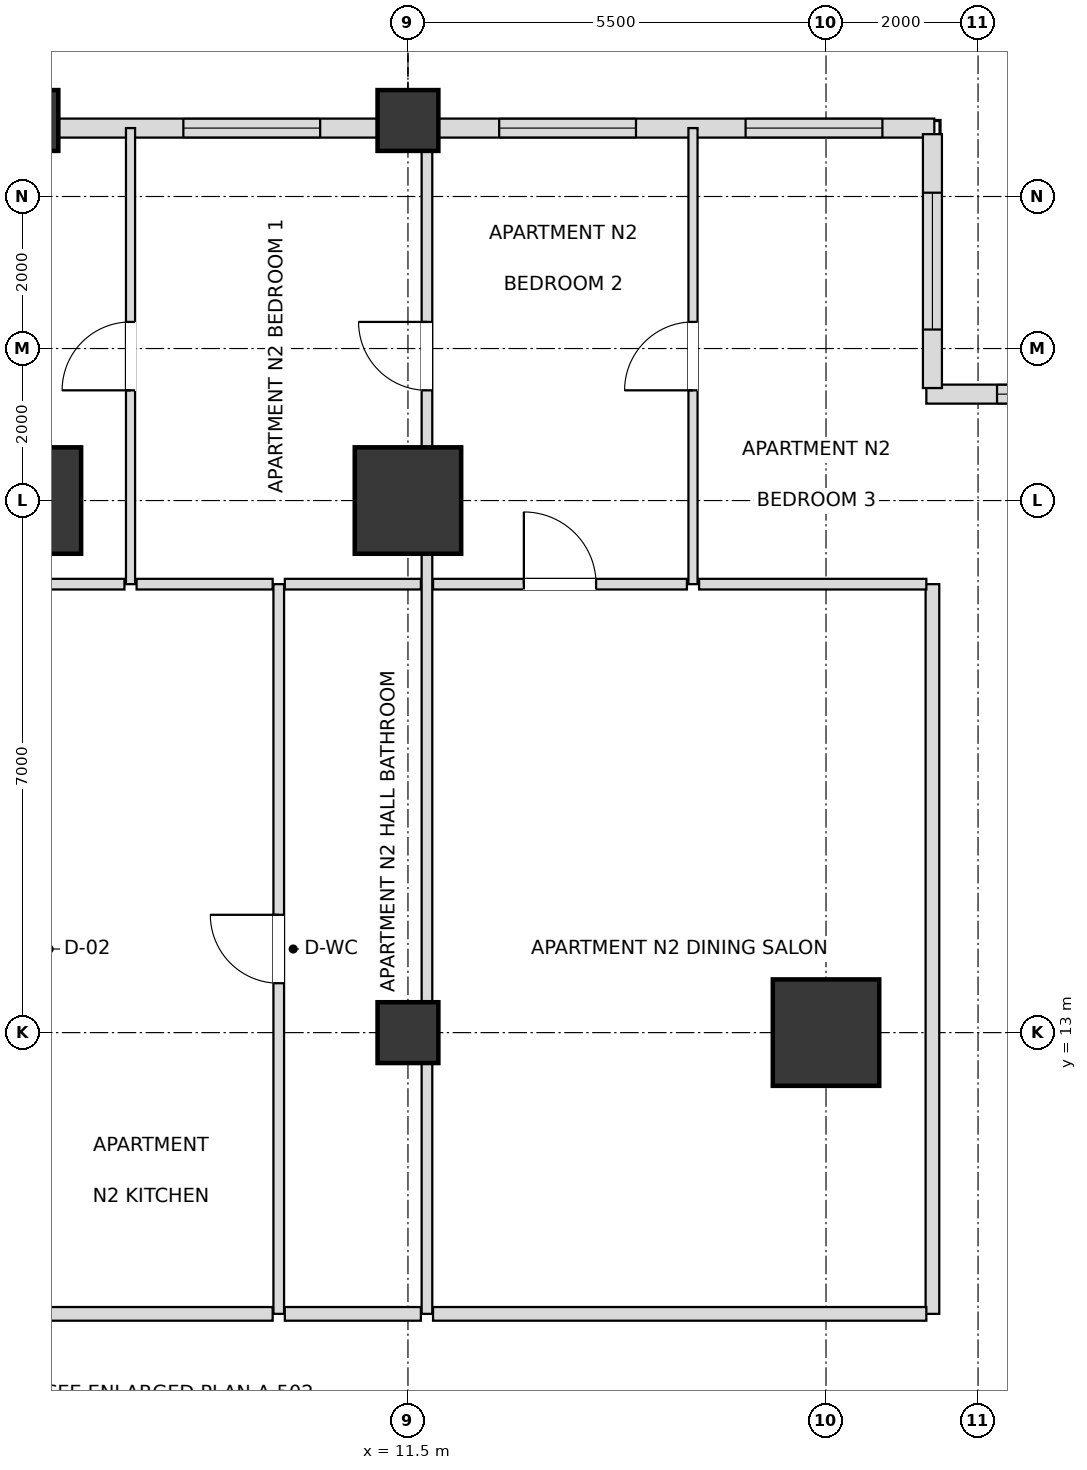
"""IFC4 building model, lengths in metres.
Left out: names, types, materials, properties, quantities, classifications, styles, units other than length and angle.
Written with IfcOpenShell. Run it as: python <this file> out.ifc"""

import sys

from ifc_helpers import new_model, si_unit, direction, frame, frame_2d, origin, origin_2d, place, context, subcontext, project, spatial, rectangle, extrude, element, fill, save


model = new_model("IFC4")
c1 = context("Model", 3, precision=1e-05, world=origin(), true_north=direction((0.0, 1.0)))
c2 = subcontext(c1, "Body", "Model", "MODEL_VIEW")
j1 = project(units=[si_unit("LENGTHUNIT", "METRE"), si_unit("PLANEANGLEUNIT", "RADIAN")], contexts=[c1])
p1 = place(None, origin())
s1 = spatial("IfcSite", under=j1, at=p1, CompositionType="ELEMENT")
p2 = place(p1, origin())
s2 = spatial("IfcBuilding", under=s1, at=p2, CompositionType="ELEMENT")
p3 = place(p2, frame((0.0, 0.0, 61.2)))
s3 = spatial("IfcBuildingStorey", under=s2, at=p3, CompositionType="ELEMENT", Elevation=61.2)
for number, where, z_axis, x_axis in (
    (1, (17.0, 13.0, 0.0), (0.0, 0.0, 1.0), (1.0, 0.0, 0.0)),
    (2, (11.5, 20.0, 0.0), (0.0, 0.0, 1.0), (1.0, 0.0, 0.0)),
    (3, (6.5, 20.0, 0.0), (0.0, 0.0, 1.0), (1.0, 0.0, 0.0)),
):
    element("IfcColumn", number, at=place(p3, frame(where, z_axis=z_axis, x_axis=x_axis)), inside=s3, PredefinedType="USERDEFINED", context=c2, shape_type="SweptSolid", body=[
        extrude(rectangle(XDim=1.4, YDim=1.4, at=origin_2d()), origin(), (0.0, 0.0, 1.0), 3.6),
    ])
for number, where, z_axis, x_axis in (
    (4, (11.5, 13.0, 0.0), (0.0, 0.0, 1.0), (1.0, 0.0, 0.0)),
    (5, (6.5, 25.0, 0.0), (0.0, 0.0, 1.0), (1.0, 0.0, 0.0)),
    (6, (11.5, 25.0, 0.0), (0.0, 0.0, 1.0), (1.0, 0.0, 0.0)),
):
    element("IfcColumn", number, at=place(p3, frame(where, z_axis=z_axis, x_axis=x_axis)), inside=s3, PredefinedType="COLUMN", context=c2, shape_type="SweptSolid", body=[
        extrude(rectangle(XDim=0.8, YDim=0.8, at=origin_2d()), origin(), (0.0, 0.0, 1.0), 3.6),
    ])
p4 = place(p3, frame((18.425, 24.9, 0.0), z_axis=(0.0, 0.0, 1.0), x_axis=(-1.0, 0.0, 0.0)))
e7 = element("IfcWall", 7, at=p4, inside=s3, PredefinedType="SOLIDWALL", context=c2, shape_type="SweptSolid", body=[
    extrude(rectangle(XDim=6.53, YDim=0.25, at=frame_2d((3.265, 0.0))), origin(), (0.0, 0.0, 1.0), 2.736),
])
p5 = place(p4, frame((0.683, 0.0, 0.72)))
e8 = element("IfcOpeningElement", 8, at=p5, cuts=e7, PredefinedType="OPENING", context=c2, shape_type="SweptSolid", body=[
    extrude(rectangle(XDim=1.8, YDim=1.68, at=frame_2d((0.9, 0.84))), frame((0.0, 0.135, 0.0), z_axis=(0.0, -1.0, 0.0), x_axis=(1.0, 0.0, 0.0)), (0.0, 0.0, 1.0), 0.27),
])
p6 = place(p4, frame((3.925, 0.0, 0.72)))
e9 = element("IfcOpeningElement", 9, at=p6, cuts=e7, PredefinedType="OPENING", context=c2, shape_type="SweptSolid", body=[
    extrude(rectangle(XDim=1.8, YDim=1.68, at=frame_2d((0.9, 0.84))), frame((0.0, 0.135, 0.0), z_axis=(0.0, -1.0, 0.0), x_axis=(1.0, 0.0, 0.0)), (0.0, 0.0, 1.0), 0.27),
])
p7 = place(p3, frame((11.105, 24.9, 0.0), z_axis=(0.0, 0.0, 1.0), x_axis=(-1.0, 0.0, 0.0)))
e10 = element("IfcWall", 10, at=p7, inside=s3, PredefinedType="SOLIDWALL", context=c2, shape_type="SweptSolid", body=[
    extrude(rectangle(XDim=4.21, YDim=0.25, at=frame_2d((2.105, 0.0))), origin(), (0.0, 0.0, 1.0), 2.736),
])
p8 = place(p7, frame((0.76, 0.0, 0.72)))
e11 = element("IfcOpeningElement", 11, at=p8, cuts=e10, PredefinedType="OPENING", context=c2, shape_type="SweptSolid", body=[
    extrude(rectangle(XDim=1.8, YDim=1.68, at=frame_2d((0.9, 0.84))), frame((0.0, 0.135, 0.0), z_axis=(0.0, -1.0, 0.0), x_axis=(1.0, 0.0, 0.0)), (0.0, 0.0, 1.0), 0.27),
])
p9 = place(p3, frame((21.98, 21.4, 0.0), z_axis=(0.0, 0.0, 1.0), x_axis=(-1.0, 0.0, 0.0)))
e12 = element("IfcWall", 12, at=p9, inside=s3, PredefinedType="SOLIDWALL", context=c2, shape_type="SweptSolid", body=[
    extrude(rectangle(XDim=3.66, YDim=0.25, at=frame_2d((1.83, 0.0))), origin(), (0.0, 0.0, 1.0), 2.736),
])
p10 = place(p9, frame((0.93, 0.0, 0.72)))
e13 = element("IfcOpeningElement", 13, at=p10, cuts=e12, PredefinedType="OPENING", context=c2, shape_type="SweptSolid", body=[
    extrude(rectangle(XDim=1.8, YDim=1.68, at=frame_2d((0.9, 0.84))), frame((0.0, 0.135, 0.0), z_axis=(0.0, -1.0, 0.0), x_axis=(1.0, 0.0, 0.0)), (0.0, 0.0, 1.0), 0.27),
])
p11 = place(p3, frame((18.4, 21.48, 0.0), z_axis=(0.0, 0.0, 1.0), x_axis=(0.0, 1.0, 0.0)))
e14 = element("IfcWall", 14, at=p11, inside=s3, PredefinedType="SOLIDWALL", context=c2, shape_type="SweptSolid", body=[
    extrude(rectangle(XDim=3.34, YDim=0.25, at=frame_2d((1.67, 0.0))), origin(), (0.0, 0.0, 1.0), 2.736),
])
p12 = place(p11, frame((0.77, 0.0, 0.72)))
e15 = element("IfcOpeningElement", 15, at=p12, cuts=e14, PredefinedType="OPENING", context=c2, shape_type="SweptSolid", body=[
    extrude(rectangle(XDim=1.8, YDim=1.68, at=frame_2d((0.9, 0.84))), frame((0.0, 0.135, 0.0), z_axis=(0.0, -1.0, 0.0), x_axis=(1.0, 0.0, 0.0)), (0.0, 0.0, 1.0), 0.27),
])
p13 = place(p3, frame((7.85, 18.9, 0.0), z_axis=(0.0, 0.0, 1.0), x_axis=(0.0, 1.0, 0.0)))
e16 = element("IfcWall", 16, at=p13, inside=s3, PredefinedType="PARTITIONING", context=c2, shape_type="SweptSolid", body=[
    extrude(rectangle(XDim=6.0, YDim=0.12, at=frame_2d((3.0, 0.0))), origin(), (0.0, 0.0, 1.0), 2.816),
])
p14 = place(p13, frame((2.55, 0.0, 0.0)))
e17 = element("IfcOpeningElement", 17, at=p14, cuts=e16, PredefinedType="OPENING", context=c2, shape_type="SweptSolid", body=[
    extrude(rectangle(XDim=0.9, YDim=2.1, at=frame_2d((0.45, 1.05))), frame((0.0, 0.07, 0.0), z_axis=(0.0, -1.0, 0.0), x_axis=(1.0, 0.0, 0.0)), (0.0, 0.0, 1.0), 0.14),
])
p15 = place(p3, frame((9.8, 9.3, 0.0), z_axis=(0.0, 0.0, 1.0), x_axis=(0.0, 1.0, 0.0)))
e18 = element("IfcWall", 18, at=p15, inside=s3, PredefinedType="PARTITIONING", context=c2, shape_type="SweptSolid", body=[
    extrude(rectangle(XDim=9.6, YDim=0.14, at=frame_2d((4.8, 0.0))), origin(), (0.0, 0.0, 1.0), 2.816),
])
p16 = place(p15, frame((4.35, 0.0, 0.0)))
e19 = element("IfcOpeningElement", 19, at=p16, cuts=e18, PredefinedType="OPENING", context=c2, shape_type="SweptSolid", body=[
    extrude(rectangle(XDim=0.9, YDim=2.1, at=frame_2d((0.45, 1.05))), frame((0.0, 0.08, 0.0), z_axis=(0.0, -1.0, 0.0), x_axis=(1.0, 0.0, 0.0)), (0.0, 0.0, 1.0), 0.16),
])
p17 = place(p3, frame((11.75, 9.3, 0.0), z_axis=(0.0, 0.0, 1.0), x_axis=(0.0, 1.0, 0.0)))
e20 = element("IfcWall", 20, at=p17, inside=s3, PredefinedType="PARTITIONING", context=c2, shape_type="SweptSolid", body=[
    extrude(rectangle(XDim=15.6, YDim=0.14, at=frame_2d((7.8, 0.0))), origin(), (0.0, 0.0, 1.0), 2.736),
])
p18 = place(p17, frame((12.15, 0.0, 0.0)))
e21 = element("IfcOpeningElement", 21, at=p18, cuts=e20, PredefinedType="OPENING", context=c2, shape_type="SweptSolid", body=[
    extrude(rectangle(XDim=0.9, YDim=2.1, at=frame_2d((0.45, 1.05))), frame((0.0, 0.08, 0.0), z_axis=(0.0, -1.0, 0.0), x_axis=(1.0, 0.0, 0.0)), (0.0, 0.0, 1.0), 0.16),
])
p19 = place(p3, frame((15.25, 18.9, 0.0), z_axis=(0.0, 0.0, 1.0), x_axis=(0.0, 1.0, 0.0)))
e22 = element("IfcWall", 22, at=p19, inside=s3, PredefinedType="PARTITIONING", context=c2, shape_type="SweptSolid", body=[
    extrude(rectangle(XDim=6.0, YDim=0.12, at=frame_2d((3.0, 0.0))), origin(), (0.0, 0.0, 1.0), 2.736),
])
p20 = place(p19, frame((2.55, 0.0, 0.0)))
e23 = element("IfcOpeningElement", 23, at=p20, cuts=e22, PredefinedType="OPENING", context=c2, shape_type="SweptSolid", body=[
    extrude(rectangle(XDim=0.9, YDim=2.1, at=frame_2d((0.45, 1.05))), frame((0.0, 0.07, 0.0), z_axis=(0.0, -1.0, 0.0), x_axis=(1.0, 0.0, 0.0)), (0.0, 0.0, 1.0), 0.14),
])
p21 = place(p3, frame((18.4, 9.3, 0.0), z_axis=(0.0, 0.0, 1.0), x_axis=(0.0, 1.0, 0.0)))
e24 = element("IfcWall", 24, at=p21, inside=s3, PredefinedType="PARTITIONING", context=c2, shape_type="SweptSolid", body=[
    extrude(rectangle(XDim=9.6, YDim=0.18, at=frame_2d((4.8, 0.0))), origin(), (0.0, 0.0, 1.0), 2.736),
])
p22 = place(p3, frame((6.68, 9.3, 0.0), z_axis=(0.0, 0.0, 1.0), x_axis=(1.0, 0.0, 0.0)))
e25 = element("IfcWall", 25, at=p22, inside=s3, PredefinedType="PARTITIONING", context=c2, shape_type="SweptSolid", body=[
    extrude(rectangle(XDim=3.04, YDim=0.18, at=frame_2d((1.52, 0.0))), origin(), (0.0, 0.0, 1.0), 3.38),
])
p23 = place(p3, frame((9.88, 9.3, 0.0), z_axis=(0.0, 0.0, 1.0), x_axis=(1.0, 0.0, 0.0)))
e26 = element("IfcWall", 26, at=p23, inside=s3, PredefinedType="PARTITIONING", context=c2, shape_type="SweptSolid", body=[
    extrude(rectangle(XDim=1.79, YDim=0.18, at=frame_2d((0.895, 0.0))), origin(), (0.0, 0.0, 1.0), 3.38),
])
p24 = place(p3, frame((11.83, 9.3, 0.0), z_axis=(0.0, 0.0, 1.0), x_axis=(1.0, 0.0, 0.0)))
e27 = element("IfcWall", 27, at=p24, inside=s3, PredefinedType="PARTITIONING", context=c2, shape_type="SweptSolid", body=[
    extrude(rectangle(XDim=6.49, YDim=0.18, at=frame_2d((3.245, 0.0))), origin(), (0.0, 0.0, 1.0), 2.816),
])
p25 = place(p3, frame((6.68, 18.9, 0.0), z_axis=(0.0, 0.0, 1.0), x_axis=(1.0, 0.0, 0.0)))
e28 = element("IfcWall", 28, at=p25, inside=s3, PredefinedType="PARTITIONING", context=c2, shape_type="SweptSolid", body=[
    extrude(rectangle(XDim=1.09, YDim=0.14, at=frame_2d((0.545, 0.0))), origin(), (0.0, 0.0, 1.0), 3.38),
])
p26 = place(p3, frame((7.93, 18.9, 0.0), z_axis=(0.0, 0.0, 1.0), x_axis=(1.0, 0.0, 0.0)))
e29 = element("IfcWall", 29, at=p26, inside=s3, PredefinedType="PARTITIONING", context=c2, shape_type="SweptSolid", body=[
    extrude(rectangle(XDim=1.79, YDim=0.14, at=frame_2d((0.895, 0.0))), origin(), (0.0, 0.0, 1.0), 3.38),
])
p27 = place(p3, frame((9.88, 18.9, 0.0), z_axis=(0.0, 0.0, 1.0), x_axis=(1.0, 0.0, 0.0)))
e30 = element("IfcWall", 30, at=p27, inside=s3, PredefinedType="PARTITIONING", context=c2, shape_type="SweptSolid", body=[
    extrude(rectangle(XDim=1.79, YDim=0.14, at=frame_2d((0.895, 0.0))), origin(), (0.0, 0.0, 1.0), 2.736),
])
p28 = place(p3, frame((11.83, 18.9, 0.0), z_axis=(0.0, 0.0, 1.0), x_axis=(1.0, 0.0, 0.0)))
e31 = element("IfcWall", 31, at=p28, inside=s3, PredefinedType="PARTITIONING", context=c2, shape_type="SweptSolid", body=[
    extrude(rectangle(XDim=3.34, YDim=0.14, at=frame_2d((1.67, 0.0))), origin(), (0.0, 0.0, 1.0), 2.736),
])
p29 = place(p28, frame((1.195, 0.0, 0.0)))
e32 = element("IfcOpeningElement", 32, at=p29, cuts=e31, PredefinedType="OPENING", context=c2, shape_type="SweptSolid", body=[
    extrude(rectangle(XDim=0.95, YDim=2.1, at=frame_2d((0.475, 1.05))), frame((0.0, 0.08, 0.0), z_axis=(0.0, -1.0, 0.0), x_axis=(1.0, 0.0, 0.0)), (0.0, 0.0, 1.0), 0.16),
])
p30 = place(p3, frame((15.33, 18.9, 0.0), z_axis=(0.0, 0.0, 1.0), x_axis=(1.0, 0.0, 0.0)))
e33 = element("IfcWall", 33, at=p30, inside=s3, PredefinedType="PARTITIONING", context=c2, shape_type="SweptSolid", body=[
    extrude(rectangle(XDim=2.99, YDim=0.14, at=frame_2d((1.495, 0.0))), origin(), (0.0, 0.0, 1.0), 2.736),
])
p31 = place(p5, origin())
e34 = element("IfcWindow", 34, at=p31, inside=s3, PartitioningType="SINGLE_PANEL", PredefinedType="WINDOW", context=c2, shape_type="SweptSolid", body=[
    extrude(rectangle(XDim=1.8, YDim=1.68, at=frame_2d((0.9, 0.84))), frame((0.0, 0.03, 0.0), z_axis=(0.0, -1.0, 0.0), x_axis=(1.0, 0.0, 0.0)), (0.0, 0.0, 1.0), 0.06),
])
fill(e8, e34)
p32 = place(p6, origin())
e35 = element("IfcWindow", 35, at=p32, inside=s3, PartitioningType="SINGLE_PANEL", PredefinedType="WINDOW", context=c2, shape_type="SweptSolid", body=[
    extrude(rectangle(XDim=1.8, YDim=1.68, at=frame_2d((0.9, 0.84))), frame((0.0, 0.03, 0.0), z_axis=(0.0, -1.0, 0.0), x_axis=(1.0, 0.0, 0.0)), (0.0, 0.0, 1.0), 0.06),
])
fill(e9, e35)
p33 = place(p8, origin())
e36 = element("IfcWindow", 36, at=p33, inside=s3, PartitioningType="SINGLE_PANEL", PredefinedType="WINDOW", context=c2, shape_type="SweptSolid", body=[
    extrude(rectangle(XDim=1.8, YDim=1.68, at=frame_2d((0.9, 0.84))), frame((0.0, 0.03, 0.0), z_axis=(0.0, -1.0, 0.0), x_axis=(1.0, 0.0, 0.0)), (0.0, 0.0, 1.0), 0.06),
])
fill(e11, e36)
p34 = place(p10, origin())
e37 = element("IfcWindow", 37, at=p34, inside=s3, PartitioningType="SINGLE_PANEL", PredefinedType="WINDOW", context=c2, shape_type="SweptSolid", body=[
    extrude(rectangle(XDim=1.8, YDim=1.68, at=frame_2d((0.9, 0.84))), frame((0.0, 0.03, 0.0), z_axis=(0.0, -1.0, 0.0), x_axis=(1.0, 0.0, 0.0)), (0.0, 0.0, 1.0), 0.06),
])
fill(e13, e37)
p35 = place(p12, origin())
e38 = element("IfcWindow", 38, at=p35, inside=s3, PartitioningType="SINGLE_PANEL", PredefinedType="WINDOW", context=c2, shape_type="SweptSolid", body=[
    extrude(rectangle(XDim=1.8, YDim=1.68, at=frame_2d((0.9, 0.84))), frame((0.0, 0.03, 0.0), z_axis=(0.0, -1.0, 0.0), x_axis=(1.0, 0.0, 0.0)), (0.0, 0.0, 1.0), 0.06),
])
fill(e15, e38)
p36 = place(p16, origin())
e39 = element("IfcDoor", 39, at=p36, inside=s3, OperationType="SINGLE_SWING_RIGHT", PredefinedType="DOOR", context=c2, shape_type="SweptSolid", body=[
    extrude(rectangle(XDim=0.9, YDim=2.1, at=frame_2d((0.45, 1.05))), frame((0.0, 0.025, 0.0), z_axis=(0.0, -1.0, 0.0), x_axis=(1.0, 0.0, 0.0)), (0.0, 0.0, 1.0), 0.05),
])
fill(e19, e39)
p37 = place(p29, origin())
e40 = element("IfcDoor", 40, at=p37, inside=s3, OperationType="SINGLE_SWING_LEFT", PredefinedType="DOOR", context=c2, shape_type="SweptSolid", body=[
    extrude(rectangle(XDim=0.95, YDim=2.1, at=frame_2d((0.475, 1.05))), frame((0.0, 0.025, 0.0), z_axis=(0.0, -1.0, 0.0), x_axis=(1.0, 0.0, 0.0)), (0.0, 0.0, 1.0), 0.05),
])
fill(e32, e40)
p38 = place(p14, origin())
e41 = element("IfcDoor", 41, at=p38, inside=s3, OperationType="SINGLE_SWING_LEFT", PredefinedType="DOOR", context=c2, shape_type="SweptSolid", body=[
    extrude(rectangle(XDim=0.9, YDim=2.1, at=frame_2d((0.45, 1.05))), frame((0.0, 0.025, 0.0), z_axis=(0.0, -1.0, 0.0), x_axis=(1.0, 0.0, 0.0)), (0.0, 0.0, 1.0), 0.05),
])
fill(e17, e41)
p39 = place(p18, origin())
e42 = element("IfcDoor", 42, at=p39, inside=s3, OperationType="SINGLE_SWING_RIGHT", PredefinedType="DOOR", context=c2, shape_type="SweptSolid", body=[
    extrude(rectangle(XDim=0.9, YDim=2.1, at=frame_2d((0.45, 1.05))), frame((0.0, 0.025, 0.0), z_axis=(0.0, -1.0, 0.0), x_axis=(1.0, 0.0, 0.0)), (0.0, 0.0, 1.0), 0.05),
])
fill(e21, e42)
p40 = place(p20, origin())
e43 = element("IfcDoor", 43, at=p40, inside=s3, OperationType="SINGLE_SWING_LEFT", PredefinedType="DOOR", context=c2, shape_type="SweptSolid", body=[
    extrude(rectangle(XDim=0.9, YDim=2.1, at=frame_2d((0.45, 1.05))), frame((0.0, 0.025, 0.0), z_axis=(0.0, -1.0, 0.0), x_axis=(1.0, 0.0, 0.0)), (0.0, 0.0, 1.0), 0.05),
])
fill(e23, e43)
save(model, sys.argv[1])
